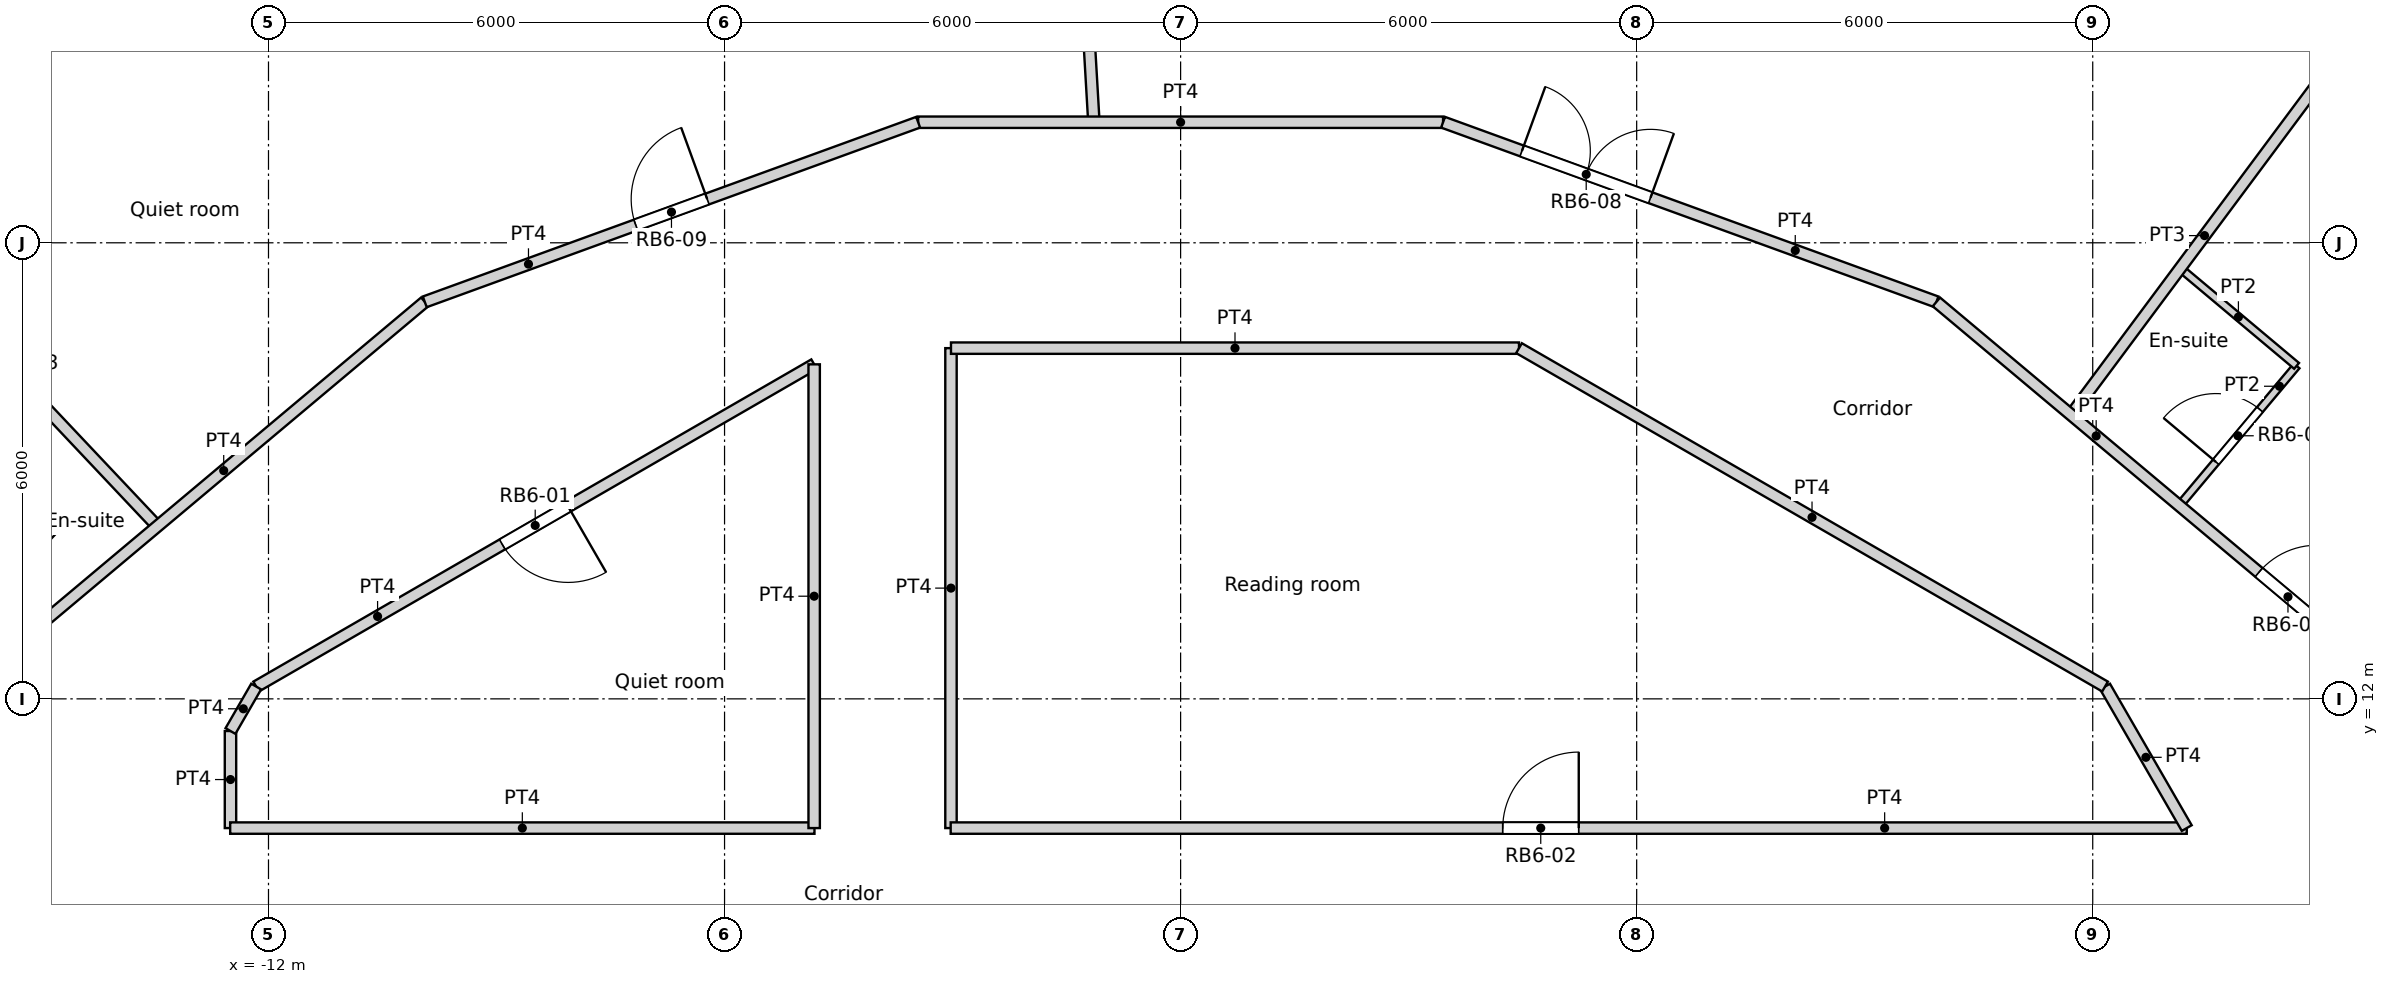
"""IFC4 building model, lengths in metres.
Left out: names, types, materials, properties, quantities, classifications, styles, units other than length and angle.
Written with IfcOpenShell. Run it as: python <this file> out.ifc"""

import sys

from ifc_helpers import new_model, si_unit, direction, frame, frame_2d, origin, origin_2d, place, context, subcontext, project, spatial, rectangle, circle, extrude, element, fill, save


model = new_model("IFC4")
c1 = context("Model", 3, precision=1e-05, world=origin(), true_north=direction((0.0, 1.0)))
c2 = subcontext(c1, "Body", "Model", "MODEL_VIEW")
j1 = project(units=[si_unit("LENGTHUNIT", "METRE"), si_unit("PLANEANGLEUNIT", "RADIAN")], contexts=[c1])
p1 = place(None, origin())
s1 = spatial("IfcSite", under=j1, at=p1, CompositionType="ELEMENT")
p2 = place(p1, origin())
s2 = spatial("IfcBuilding", under=s1, at=p2, CompositionType="ELEMENT")
p3 = place(p2, frame((0.0, 0.0, 180.0)))
s3 = spatial("IfcBuildingStorey", under=s2, at=p3, CompositionType="ELEMENT", Elevation=180.0)
p4 = place(p3, frame((14.659, 19.69, 0.0), z_axis=(0.0, 0.0, 1.0), x_axis=(1.0, 0.0, 0.0)))
e1 = element("IfcColumn", 1, at=p4, inside=s3, PredefinedType="COLUMN", context=c2, shape_type="SweptSolid", body=[
    extrude(circle(Radius=0.6, at=origin_2d()), origin(), (0.0, 0.0, 1.0), 3.6),
])
for number, where, z_axis, x_axis in (
    (2, (11.735, 14.716, 0.0), (0.0, 0.0, 1.0), (1.0, 0.0, 0.0)),
    (3, (6.876, 17.521, 0.0), (0.0, 0.0, 1.0), (1.0, 0.0, 0.0)),
    (4, (1.406, 18.77, 0.0), (0.0, 0.0, 1.0), (1.0, 0.0, 0.0)),
    (5, (-4.188, 18.35, 0.0), (0.0, 0.0, 1.0), (1.0, 0.0, 0.0)),
    (6, (-9.411, 16.301, 0.0), (0.0, 0.0, 1.0), (1.0, 0.0, 0.0)),
    (7, (-13.798, 12.802, 0.0), (0.0, 0.0, 1.0), (1.0, 0.0, 0.0)),
):
    element("IfcColumn", number, at=place(p3, frame(where, z_axis=z_axis, x_axis=x_axis)), inside=s3, PredefinedType="COLUMN", context=c2, shape_type="SweptSolid", body=[
        extrude(circle(Radius=0.65, at=origin_2d()), origin(), (0.0, 0.0, 1.0), 3.6),
    ])
p5 = place(p3, frame((15.639, 21.048, -0.3), z_axis=(0.0, 0.0, 1.0), x_axis=(-0.835514416706, 0.549468524554, 0.0)))
e8 = element("IfcWall", 8, at=p5, inside=s3, PredefinedType="ELEMENTEDWALL", context=c2, shape_type="SweptSolid", body=[
    extrude(rectangle(XDim=3.0, YDim=1.45, at=frame_2d((1.5, 0.0))), origin(), (0.0, 0.0, 1.0), 3.6),
])
p6 = place(p5, frame((1.5, 0.0, 1.85)))
e9 = element("IfcOpeningElement", 9, at=p6, cuts=e8, PredefinedType="OPENING", context=c2, shape_type="SweptSolid", body=[
    extrude(circle(Radius=0.9, at=origin_2d()), frame((0.0, 0.735, 0.0), z_axis=(0.0, -1.0, 0.0), x_axis=(1.0, 0.0, 0.0)), (0.0, 0.0, 1.0), 1.47),
])
p7 = place(p3, frame((-12.832, 22.206, 0.0), z_axis=(0.0, 0.0, 1.0), x_axis=(-0.835508361394, -0.54947773207, 0.0)))
e10 = element("IfcWall", 10, at=p7, inside=s3, PredefinedType="SOLIDWALL", context=c2, shape_type="SweptSolid", body=[
    extrude(rectangle(XDim=2.973, YDim=0.3, at=frame_2d((1.486, 0.0))), origin(), (0.0, 0.0, 1.0), 3.3),
])
p8 = place(p7, frame((1.486, 0.0, 1.55)))
e11 = element("IfcOpeningElement", 11, at=p8, cuts=e10, PredefinedType="OPENING", context=c2, shape_type="SweptSolid", body=[
    extrude(circle(Radius=0.9, at=origin_2d()), frame((0.0, 0.16, 0.0), z_axis=(0.0, -1.0, 0.0), x_axis=(1.0, 0.0, 0.0)), (0.0, 0.0, 1.0), 0.32),
])
p9 = place(p3, frame((-12.504, 10.3, 0.0), z_axis=(0.0, 0.0, 1.0), x_axis=(1.0, 0.0, 0.0)))
e12 = element("IfcWall", 12, at=p9, inside=s3, PredefinedType="PARTITIONING", context=c2, shape_type="SweptSolid", body=[
    extrude(rectangle(XDim=7.687, YDim=0.15, at=frame_2d((3.844, 0.0))), origin(), (0.0, 0.0, 1.0), 3.3),
])
p10 = place(p3, frame((-3.025, 10.3, 0.0), z_axis=(0.0, 0.0, 1.0), x_axis=(1.0, 0.0, 0.0)))
e13 = element("IfcWall", 13, at=p10, inside=s3, PredefinedType="PARTITIONING", context=c2, shape_type="SweptSolid", body=[
    extrude(rectangle(XDim=16.262, YDim=0.15, at=frame_2d((8.131, 0.0))), origin(), (0.0, 0.0, 1.0), 3.3),
])
p11 = place(p10, frame((7.263, 0.0, 0.0)))
e14 = element("IfcOpeningElement", 14, at=p11, cuts=e13, PredefinedType="OPENING", context=c2, shape_type="SweptSolid", body=[
    extrude(rectangle(XDim=1.0, YDim=2.04, at=frame_2d((0.5, 1.02))), frame((0.0, 0.075, 0.0), z_axis=(0.0, -1.0, 0.0), x_axis=(1.0, 0.0, 0.0)), (0.0, 0.0, 1.0), 0.15),
])
p12 = place(p3, frame((12.162, 12.162, 0.0), z_axis=(0.0, 0.0, 1.0), x_axis=(0.499961633463, -0.866047553582, 0.0)))
e15 = element("IfcWall", 15, at=p12, inside=s3, PredefinedType="PARTITIONING", context=c2, shape_type="SweptSolid", body=[
    extrude(rectangle(XDim=2.15, YDim=0.15, at=frame_2d((1.075, 0.0))), origin(), (0.0, 0.0, 1.0), 3.3),
])
p13 = place(p3, frame((9.943, 17.222, 0.0), z_axis=(0.0, 0.0, 1.0), x_axis=(0.766192104565, -0.642611592567, 0.0)))
e16 = element("IfcWall", 16, at=p13, inside=s3, PredefinedType="PARTITIONING", context=c2, shape_type="SweptSolid", body=[
    extrude(rectangle(XDim=6.906, YDim=0.15, at=frame_2d((3.453, 0.0))), origin(), (0.0, 0.0, 1.0), 3.3),
])
p14 = place(p13, frame((5.537, 0.0, 0.0)))
e17 = element("IfcOpeningElement", 17, at=p14, cuts=e16, PredefinedType="OPENING", context=c2, shape_type="SweptSolid", body=[
    extrude(rectangle(XDim=1.0, YDim=2.1, at=frame_2d((0.5, 1.05))), frame((0.0, 0.075, 0.0), z_axis=(0.0, -1.0, 0.0), x_axis=(1.0, 0.0, 0.0)), (0.0, 0.0, 1.0), 0.15),
])
p15 = place(p3, frame((-4.821, 10.3, 0.0), z_axis=(0.0, 0.0, 1.0), x_axis=(0.0, 1.0, 0.0)))
e18 = element("IfcWall", 18, at=p15, inside=s3, PredefinedType="PARTITIONING", context=c2, shape_type="SweptSolid", body=[
    extrude(rectangle(XDim=6.101, YDim=0.15, at=frame_2d((3.05, 0.0))), origin(), (0.0, 0.0, 1.0), 3.3),
])
p16 = place(p3, frame((-12.162, 12.162, 0.0), z_axis=(0.0, 0.0, 1.0), x_axis=(0.866004766557, 0.500035743023, 0.0)))
e19 = element("IfcWall", 19, at=p16, inside=s3, PredefinedType="PARTITIONING", context=c2, shape_type="SweptSolid", body=[
    extrude(rectangle(XDim=8.477, YDim=0.15, at=frame_2d((4.239, 0.0))), origin(), (0.0, 0.0, 1.0), 3.3),
])
p17 = place(p16, frame((3.739, 0.0, 0.0)))
e20 = element("IfcOpeningElement", 20, at=p17, cuts=e19, PredefinedType="OPENING", context=c2, shape_type="SweptSolid", body=[
    extrude(rectangle(XDim=1.0, YDim=2.04, at=frame_2d((0.5, 1.02))), frame((0.0, 0.075, 0.0), z_axis=(0.0, -1.0, 0.0), x_axis=(1.0, 0.0, 0.0)), (0.0, 0.0, 1.0), 0.15),
])
p18 = place(p3, frame((4.452, 16.614, 0.0), z_axis=(0.0, 0.0, 1.0), x_axis=(0.866005203721, -0.500034985904, 0.0)))
e21 = element("IfcWall", 21, at=p18, inside=s3, PredefinedType="PARTITIONING", context=c2, shape_type="SweptSolid", body=[
    extrude(rectangle(XDim=8.903, YDim=0.15, at=frame_2d((4.452, 0.0))), origin(), (0.0, 0.0, 1.0), 3.3),
])
p19 = place(p3, frame((-3.021, 16.614, 0.0), z_axis=(0.0, 0.0, 1.0), x_axis=(1.0, 0.0, 0.0)))
e22 = element("IfcWall", 22, at=p19, inside=s3, PredefinedType="PARTITIONING", context=c2, shape_type="SweptSolid", body=[
    extrude(rectangle(XDim=7.473, YDim=0.15, at=frame_2d((3.736, 0.0))), origin(), (0.0, 0.0, 1.0), 3.3),
])
p20 = place(p3, frame((-3.021, 10.3, 0.0), z_axis=(0.0, 0.0, 1.0), x_axis=(0.0, 1.0, 0.0)))
e23 = element("IfcWall", 23, at=p20, inside=s3, PredefinedType="PARTITIONING", context=c2, shape_type="SweptSolid", body=[
    extrude(rectangle(XDim=6.314, YDim=0.15, at=frame_2d((3.157, 0.0))), origin(), (0.0, 0.0, 1.0), 3.3),
])
p21 = place(p3, frame((-3.453, 19.586, 0.0), z_axis=(0.0, 0.0, 1.0), x_axis=(1.0, 0.0, 0.0)))
e24 = element("IfcWall", 24, at=p21, inside=s3, PredefinedType="PARTITIONING", context=c2, shape_type="SweptSolid", body=[
    extrude(rectangle(XDim=6.906, YDim=0.15, at=frame_2d((3.453, 0.0))), origin(), (0.0, 0.0, 1.0), 3.3),
])
p22 = place(p3, frame((3.453, 19.586, 0.0), z_axis=(0.0, 0.0, 1.0), x_axis=(0.939672634566, -0.342075050021, 0.0)))
e25 = element("IfcWall", 25, at=p22, inside=s3, PredefinedType="PARTITIONING", context=c2, shape_type="SweptSolid", body=[
    extrude(rectangle(XDim=6.908, YDim=0.15, at=frame_2d((3.454, 0.0))), origin(), (0.0, 0.0, 1.0), 3.3),
])
p23 = place(p22, frame((1.104, 0.0, 0.0)))
e26 = element("IfcOpeningElement", 26, at=p23, cuts=e25, PredefinedType="OPENING", context=c2, shape_type="SweptSolid", body=[
    extrude(rectangle(XDim=1.8, YDim=2.1, at=frame_2d((0.9, 1.05))), frame((0.0, 0.075, 0.0), z_axis=(0.0, -1.0, 0.0), x_axis=(1.0, 0.0, 0.0)), (0.0, 0.0, 1.0), 0.15),
])
p24 = place(p3, frame((-15.234, 12.783, 0.0), z_axis=(0.0, 0.0, 1.0), x_axis=(0.765968036922, 0.642878656058, 0.0)))
e27 = element("IfcWall", 27, at=p24, inside=s3, PredefinedType="PARTITIONING", context=c2, shape_type="SweptSolid", body=[
    extrude(rectangle(XDim=6.906, YDim=0.15, at=frame_2d((3.453, 0.0))), origin(), (0.0, 0.0, 1.0), 3.3),
])
p25 = place(p3, frame((-9.944, 17.223, 0.0), z_axis=(0.0, 0.0, 1.0), x_axis=(0.939672634566, 0.342075050021, 0.0)))
e28 = element("IfcWall", 28, at=p25, inside=s3, PredefinedType="PARTITIONING", context=c2, shape_type="SweptSolid", body=[
    extrude(rectangle(XDim=6.908, YDim=0.15, at=frame_2d((3.454, 0.0))), origin(), (0.0, 0.0, 1.0), 3.3),
])
p26 = place(p25, frame((2.954, 0.0, 0.0)))
e29 = element("IfcOpeningElement", 29, at=p26, cuts=e28, PredefinedType="OPENING", context=c2, shape_type="SweptSolid", body=[
    extrude(rectangle(XDim=1.0, YDim=2.04, at=frame_2d((0.5, 1.02))), frame((0.0, 0.075, 0.0), z_axis=(0.0, -1.0, 0.0), x_axis=(1.0, 0.0, 0.0)), (0.0, 0.0, 1.0), 0.15),
])
p27 = place(p3, frame((-12.5, 11.577, 0.0), z_axis=(0.0, 0.0, 1.0), x_axis=(0.500024767483, 0.866011103799, 0.0)))
e30 = element("IfcWall", 30, at=p27, inside=s3, PredefinedType="PARTITIONING", context=c2, shape_type="SweptSolid", body=[
    extrude(rectangle(XDim=0.676, YDim=0.15, at=frame_2d((0.338, 0.0))), origin(), (0.0, 0.0, 1.0), 3.3),
])
p28 = place(p3, frame((-12.5, 10.3, 0.0), z_axis=(0.0, 0.0, 1.0), x_axis=(0.0, 1.0, 0.0)))
e31 = element("IfcWall", 31, at=p28, inside=s3, PredefinedType="PARTITIONING", context=c2, shape_type="SweptSolid", body=[
    extrude(rectangle(XDim=1.277, YDim=0.15, at=frame_2d((0.638, 0.0))), origin(), (0.0, 0.0, 1.0), 3.3),
])
p29 = place(p3, frame((13.139, 14.542, 0.0), z_axis=(0.0, 0.0, 1.0), x_axis=(0.642731657745, 0.766091388891, 0.0)))
e32 = element("IfcWall", 32, at=p29, inside=s3, PredefinedType="PARTITIONING", context=c2, shape_type="SweptSolid", body=[
    extrude(rectangle(XDim=2.401, YDim=0.1, at=frame_2d((1.2, 0.0))), origin(), (0.0, 0.0, 1.0), 3.3),
])
p30 = place(p29, frame((0.75, 0.0, 0.0)))
e33 = element("IfcOpeningElement", 33, at=p30, cuts=e32, PredefinedType="OPENING", context=c2, shape_type="SweptSolid", body=[
    extrude(rectangle(XDim=0.9, YDim=2.04, at=frame_2d((0.45, 1.02))), frame((0.0, 0.05, 0.0), z_axis=(0.0, -1.0, 0.0), x_axis=(1.0, 0.0, 0.0)), (0.0, 0.0, 1.0), 0.1),
])
p31 = place(p3, frame((13.151, 17.665, 0.0), z_axis=(0.0, 0.0, 1.0), x_axis=(0.766224532916, -0.642572925945, 0.0)))
e34 = element("IfcWall", 34, at=p31, inside=s3, PredefinedType="PARTITIONING", context=c2, shape_type="SweptSolid", body=[
    extrude(rectangle(XDim=1.998, YDim=0.1, at=frame_2d((0.999, 0.0))), origin(), (0.0, 0.0, 1.0), 3.3),
])
p32 = place(p3, frame((11.716, 15.737, 0.0), z_axis=(0.0, 0.0, 1.0), x_axis=(0.597198494348, 0.802093484793, 0.0)))
e35 = element("IfcWall", 35, at=p32, inside=s3, PredefinedType="PARTITIONING", context=c2, shape_type="SweptSolid", body=[
    extrude(rectangle(XDim=5.878, YDim=0.15, at=frame_2d((2.939, 0.0))), origin(), (0.0, 0.0, 1.0), 3.3),
])
p33 = place(p3, frame((-1.483, 25.454, 0.0), z_axis=(0.0, 0.0, 1.0), x_axis=(0.058147412668, -0.998308007781, 0.0)))
e36 = element("IfcWall", 36, at=p33, inside=s3, PredefinedType="PARTITIONING", context=c2, shape_type="SweptSolid", body=[
    extrude(rectangle(XDim=5.878, YDim=0.15, at=frame_2d((2.939, 0.0))), origin(), (0.0, 0.0, 1.0), 3.3),
])
p34 = place(p3, frame((-17.497, 18.546, 0.0), z_axis=(0.0, 0.0, 1.0), x_axis=(0.68633567779, -0.727284907991, 0.0)))
e37 = element("IfcWall", 37, at=p34, inside=s3, PredefinedType="PARTITIONING", context=c2, shape_type="SweptSolid", body=[
    extrude(rectangle(XDim=5.879, YDim=0.15, at=frame_2d((2.939, 0.0))), origin(), (0.0, 0.0, 1.0), 3.3),
])
p35 = place(p17, origin())
e38 = element("IfcDoor", 38, at=p35, inside=s3, OperationType="SINGLE_SWING_LEFT", PredefinedType="DOOR", context=c2, shape_type="SweptSolid", body=[
    extrude(rectangle(XDim=1.0, YDim=2.04, at=frame_2d((0.5, 1.02))), frame((0.0, 0.025, 0.0), z_axis=(0.0, -1.0, 0.0), x_axis=(1.0, 0.0, 0.0)), (0.0, 0.0, 1.0), 0.05),
])
fill(e20, e38)
p36 = place(p11, origin())
e39 = element("IfcDoor", 39, at=p36, inside=s3, OperationType="SINGLE_SWING_RIGHT", PredefinedType="DOOR", context=c2, shape_type="SweptSolid", body=[
    extrude(rectangle(XDim=1.0, YDim=2.04, at=frame_2d((0.5, 1.02))), frame((0.0, 0.025, 0.0), z_axis=(0.0, -1.0, 0.0), x_axis=(1.0, 0.0, 0.0)), (0.0, 0.0, 1.0), 0.05),
])
fill(e14, e39)
p37 = place(p30, origin())
e40 = element("IfcDoor", 40, at=p37, inside=s3, OperationType="SINGLE_SWING_LEFT", PredefinedType="DOOR", context=c2, shape_type="SweptSolid", body=[
    extrude(rectangle(XDim=0.9, YDim=2.04, at=frame_2d((0.45, 1.02))), frame((0.0, 0.025, 0.0), z_axis=(0.0, -1.0, 0.0), x_axis=(1.0, 0.0, 0.0)), (0.0, 0.0, 1.0), 0.05),
])
fill(e33, e40)
p38 = place(p14, origin())
e41 = element("IfcDoor", 41, at=p38, inside=s3, OperationType="SINGLE_SWING_RIGHT", PredefinedType="DOOR", context=c2, shape_type="SweptSolid", body=[
    extrude(rectangle(XDim=1.0, YDim=2.1, at=frame_2d((0.5, 1.05))), frame((0.0, 0.025, 0.0), z_axis=(0.0, -1.0, 0.0), x_axis=(1.0, 0.0, 0.0)), (0.0, 0.0, 1.0), 0.05),
])
fill(e17, e41)
p39 = place(p23, origin())
e42 = element("IfcDoor", 42, at=p39, inside=s3, OperationType="DOUBLE_DOOR_SINGLE_SWING", PredefinedType="DOOR", context=c2, shape_type="SweptSolid", body=[
    extrude(rectangle(XDim=1.8, YDim=2.1, at=frame_2d((0.9, 1.05))), frame((0.0, 0.025, 0.0), z_axis=(0.0, -1.0, 0.0), x_axis=(1.0, 0.0, 0.0)), (0.0, 0.0, 1.0), 0.05),
])
fill(e26, e42)
p40 = place(p26, origin())
e43 = element("IfcDoor", 43, at=p40, inside=s3, OperationType="SINGLE_SWING_RIGHT", PredefinedType="DOOR", context=c2, shape_type="SweptSolid", body=[
    extrude(rectangle(XDim=1.0, YDim=2.04, at=frame_2d((0.5, 1.02))), frame((0.0, 0.025, 0.0), z_axis=(0.0, -1.0, 0.0), x_axis=(1.0, 0.0, 0.0)), (0.0, 0.0, 1.0), 0.05),
])
fill(e29, e43)
save(model, sys.argv[1])
